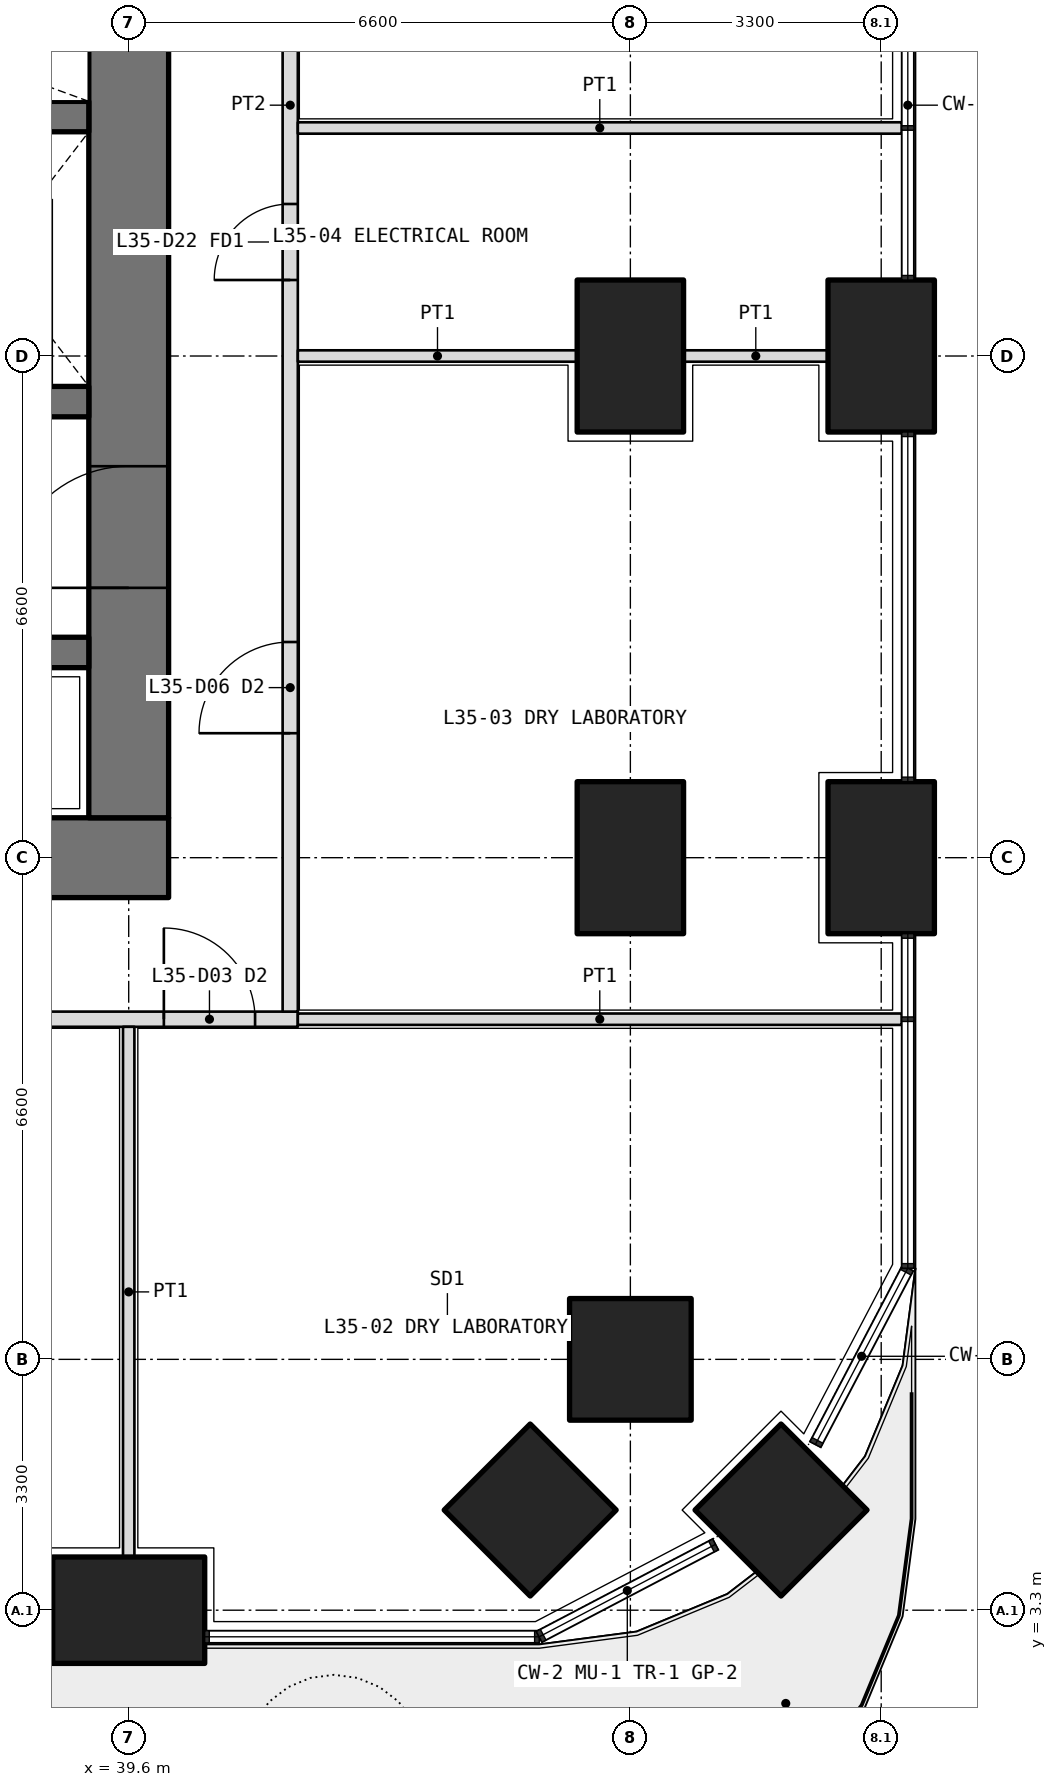
"""IFC4 building model, lengths in metres.
Left out: names, types, materials, properties, quantities, classifications, styles, units other than length and angle.
Written with IfcOpenShell. Run it as: python <this file> out.ifc"""

import sys

from ifc_helpers import new_model, si_unit, direction, frame, frame_2d, origin, origin_2d, place, context, subcontext, project, spatial, rectangle, extrude, element, fill, save


model = new_model("IFC4")
c1 = context("Model", 3, precision=1e-05, world=origin(), true_north=direction((0.0, 1.0)))
c2 = subcontext(c1, "Body", "Model", "MODEL_VIEW")
j1 = project(units=[si_unit("LENGTHUNIT", "METRE"), si_unit("PLANEANGLEUNIT", "RADIAN")], contexts=[c1])
p1 = place(None, origin())
s1 = spatial("IfcSite", under=j1, at=p1, CompositionType="ELEMENT")
p2 = place(p1, origin())
s2 = spatial("IfcBuilding", under=s1, at=p2, CompositionType="ELEMENT")
p3 = place(p2, frame((0.0, 0.0, 155.7)))
s3 = spatial("IfcBuildingStorey", under=s2, at=p3, CompositionType="ELEMENT", Elevation=155.7)
p4 = place(p3, frame((48.182, 4.618, 0.0), z_axis=(0.0, 0.0, 1.0), x_axis=(0.707106781187, 0.707106781187, 0.0)))
e1 = element("IfcColumn", 1, at=p4, inside=s3, PredefinedType="COLUMN", context=c2, shape_type="SweptSolid", body=[
    extrude(rectangle(XDim=1.6, YDim=1.6, at=origin_2d()), origin(), (0.0, 0.0, 1.0), 4.2),
])
for number, where, z_axis, x_axis in (
    (2, (39.6, 3.3, 0.0), (0.0, 0.0, 1.0), (1.0, 0.0, 0.0)),
    (3, (49.5, 13.2, 0.0), (0.0, 0.0, 1.0), (0.0, 1.0, 0.0)),
    (4, (49.5, 19.8, 0.0), (0.0, 0.0, 1.0), (0.0, 1.0, 0.0)),
):
    element("IfcColumn", number, at=place(p3, frame(where, z_axis=z_axis, x_axis=x_axis)), inside=s3, PredefinedType="COLUMN", context=c2, shape_type="SweptSolid", body=[
        extrude(rectangle(XDim=2.0, YDim=1.4, at=origin_2d()), origin(), (0.0, 0.0, 1.0), 4.2),
    ])
for number, where, z_axis, x_axis in (
    (5, (46.2, 6.6, 0.0), (0.0, 0.0, 1.0), (1.0, 0.0, 0.0)),
    (6, (44.882, 4.618, 0.0), (0.0, 0.0, 1.0), (0.707, 0.707, 0.0)),
):
    element("IfcColumn", number, at=place(p3, frame(where, z_axis=z_axis, x_axis=x_axis)), inside=s3, PredefinedType="COLUMN", context=c2, shape_type="SweptSolid", body=[
        extrude(rectangle(XDim=1.6, YDim=1.6, at=origin_2d()), origin(), (0.0, 0.0, 1.0), 4.2),
    ])
for number, where, z_axis, x_axis in (
    (7, (46.2, 13.2, 0.0), (0.0, 0.0, 1.0), (0.0, 1.0, 0.0)),
    (8, (46.2, 19.8, 0.0), (0.0, 0.0, 1.0), (0.0, 1.0, 0.0)),
):
    element("IfcColumn", number, at=place(p3, frame(where, z_axis=z_axis, x_axis=x_axis)), inside=s3, PredefinedType="COLUMN", context=c2, shape_type="SweptSolid", body=[
        extrude(rectangle(XDim=2.0, YDim=1.4, at=origin_2d()), origin(), (0.0, 0.0, 1.0), 4.2),
    ])
p5 = place(p3, frame((12.675, 13.2, 0.0), z_axis=(0.0, 0.0, 1.0), x_axis=(1.0, 0.0, 0.0)))
e9 = element("IfcWall", 9, at=p5, inside=s3, PredefinedType="SHEAR", context=c2, shape_type="SweptSolid", body=[
    extrude(rectangle(XDim=27.45, YDim=1.05, at=frame_2d((13.725, 0.0))), origin(), (0.0, 0.0, 1.0), 4.2),
])
p6 = place(p3, frame((39.6, 13.725, 0.0), z_axis=(0.0, 0.0, 1.0), x_axis=(0.0, 1.0, 0.0)))
e10 = element("IfcWall", 10, at=p6, inside=s3, PredefinedType="SHEAR", context=c2, shape_type="SweptSolid", body=[
    extrude(rectangle(XDim=18.75, YDim=1.05, at=frame_2d((9.375, 0.0))), origin(), (0.0, 0.0, 1.0), 4.2),
])
p7 = place(p6, frame((3.025, 0.0, 0.0)))
e11 = element("IfcOpeningElement", 11, at=p7, cuts=e10, PredefinedType="OPENING", context=c2, shape_type="SweptSolid", body=[
    extrude(rectangle(XDim=1.6, YDim=2.1, at=frame_2d((0.8, 1.05))), frame((0.0, 0.535, 0.0), z_axis=(0.0, -1.0, 0.0), x_axis=(1.0, 0.0, 0.0)), (0.0, 0.0, 1.0), 1.07),
])
p8 = place(p6, frame((13.825, 0.0, 0.0)))
e12 = element("IfcOpeningElement", 12, at=p8, cuts=e10, PredefinedType="OPENING", context=c2, shape_type="SweptSolid", body=[
    extrude(rectangle(XDim=1.6, YDim=2.1, at=frame_2d((0.8, 1.05))), frame((0.0, 0.535, 0.0), z_axis=(0.0, -1.0, 0.0), x_axis=(1.0, 0.0, 0.0)), (0.0, 0.0, 1.0), 1.07),
])
p9 = place(p3, frame((13.725, 15.9, 0.0), z_axis=(0.0, 0.0, 1.0), x_axis=(1.0, 0.0, 0.0)))
e13 = element("IfcWall", 13, at=p9, inside=s3, PredefinedType="SHEAR", context=c2, shape_type="SweptSolid", body=[
    extrude(rectangle(XDim=25.35, YDim=0.4, at=frame_2d((12.675, 0.0))), origin(), (0.0, 0.0, 1.0), 4.2),
])
p10 = place(p9, frame((0.837, 0.0, 0.0)))
e14 = element("IfcOpeningElement", 14, at=p10, cuts=e13, PredefinedType="OPENING", context=c2, shape_type="SweptSolid", body=[
    extrude(rectangle(XDim=1.0, YDim=2.1, at=frame_2d((0.5, 1.05))), frame((0.0, 0.21, 0.0), z_axis=(0.0, -1.0, 0.0), x_axis=(1.0, 0.0, 0.0)), (0.0, 0.0, 1.0), 0.42),
])
p11 = place(p9, frame((3.925, 0.0, 0.0)))
e15 = element("IfcOpeningElement", 15, at=p11, cuts=e13, PredefinedType="OPENING", context=c2, shape_type="SweptSolid", body=[
    extrude(rectangle(XDim=1.0, YDim=2.1, at=frame_2d((0.5, 1.05))), frame((0.0, 0.21, 0.0), z_axis=(0.0, -1.0, 0.0), x_axis=(1.0, 0.0, 0.0)), (0.0, 0.0, 1.0), 0.42),
])
p12 = place(p9, frame((7.225, 0.0, 0.0)))
e16 = element("IfcOpeningElement", 16, at=p12, cuts=e13, PredefinedType="OPENING", context=c2, shape_type="SweptSolid", body=[
    extrude(rectangle(XDim=1.0, YDim=2.1, at=frame_2d((0.5, 1.05))), frame((0.0, 0.21, 0.0), z_axis=(0.0, -1.0, 0.0), x_axis=(1.0, 0.0, 0.0)), (0.0, 0.0, 1.0), 0.42),
])
p13 = place(p9, frame((10.525, 0.0, 0.0)))
e17 = element("IfcOpeningElement", 17, at=p13, cuts=e13, PredefinedType="OPENING", context=c2, shape_type="SweptSolid", body=[
    extrude(rectangle(XDim=1.0, YDim=2.1, at=frame_2d((0.5, 1.05))), frame((0.0, 0.21, 0.0), z_axis=(0.0, -1.0, 0.0), x_axis=(1.0, 0.0, 0.0)), (0.0, 0.0, 1.0), 0.42),
])
p14 = place(p9, frame((13.825, 0.0, 0.0)))
e18 = element("IfcOpeningElement", 18, at=p14, cuts=e13, PredefinedType="OPENING", context=c2, shape_type="SweptSolid", body=[
    extrude(rectangle(XDim=1.0, YDim=2.1, at=frame_2d((0.5, 1.05))), frame((0.0, 0.21, 0.0), z_axis=(0.0, -1.0, 0.0), x_axis=(1.0, 0.0, 0.0)), (0.0, 0.0, 1.0), 0.42),
])
p15 = place(p9, frame((17.125, 0.0, 0.0)))
e19 = element("IfcOpeningElement", 19, at=p15, cuts=e13, PredefinedType="OPENING", context=c2, shape_type="SweptSolid", body=[
    extrude(rectangle(XDim=1.0, YDim=2.1, at=frame_2d((0.5, 1.05))), frame((0.0, 0.21, 0.0), z_axis=(0.0, -1.0, 0.0), x_axis=(1.0, 0.0, 0.0)), (0.0, 0.0, 1.0), 0.42),
])
p16 = place(p9, frame((20.425, 0.0, 0.0)))
e20 = element("IfcOpeningElement", 20, at=p16, cuts=e13, PredefinedType="OPENING", context=c2, shape_type="SweptSolid", body=[
    extrude(rectangle(XDim=1.0, YDim=2.1, at=frame_2d((0.5, 1.05))), frame((0.0, 0.21, 0.0), z_axis=(0.0, -1.0, 0.0), x_axis=(1.0, 0.0, 0.0)), (0.0, 0.0, 1.0), 0.42),
])
p17 = place(p9, frame((23.512, 0.0, 0.0)))
e21 = element("IfcOpeningElement", 21, at=p17, cuts=e13, PredefinedType="OPENING", context=c2, shape_type="SweptSolid", body=[
    extrude(rectangle(XDim=1.0, YDim=2.1, at=frame_2d((0.5, 1.05))), frame((0.0, 0.21, 0.0), z_axis=(0.0, -1.0, 0.0), x_axis=(1.0, 0.0, 0.0)), (0.0, 0.0, 1.0), 0.42),
])
p18 = place(p3, frame((13.725, 19.2, 0.0), z_axis=(0.0, 0.0, 1.0), x_axis=(1.0, 0.0, 0.0)))
e22 = element("IfcWall", 22, at=p18, inside=s3, PredefinedType="SHEAR", context=c2, shape_type="SweptSolid", body=[
    extrude(rectangle(XDim=25.35, YDim=0.4, at=frame_2d((12.675, 0.0))), origin(), (0.0, 0.0, 1.0), 4.2),
])
p19 = place(p18, frame((10.575, 0.0, 0.0)))
e23 = element("IfcOpeningElement", 23, at=p19, cuts=e22, PredefinedType="OPENING", context=c2, shape_type="SweptSolid", body=[
    extrude(rectangle(XDim=0.9, YDim=2.1, at=frame_2d((0.45, 1.05))), frame((0.0, 0.21, 0.0), z_axis=(0.0, -1.0, 0.0), x_axis=(1.0, 0.0, 0.0)), (0.0, 0.0, 1.0), 0.42),
])
p20 = place(p18, frame((13.875, 0.0, 0.0)))
e24 = element("IfcOpeningElement", 24, at=p20, cuts=e22, PredefinedType="OPENING", context=c2, shape_type="SweptSolid", body=[
    extrude(rectangle(XDim=0.9, YDim=2.1, at=frame_2d((0.45, 1.05))), frame((0.0, 0.21, 0.0), z_axis=(0.0, -1.0, 0.0), x_axis=(1.0, 0.0, 0.0)), (0.0, 0.0, 1.0), 0.42),
])
p21 = place(p18, frame((0.2, 0.0, 0.0)))
e25 = element("IfcOpeningElement", 25, at=p21, cuts=e22, PredefinedType="OPENING", context=c2, shape_type="SweptSolid", body=[
    extrude(rectangle(XDim=1.2, YDim=2.1, at=frame_2d((0.6, 1.05))), frame((0.0, 0.21, 0.0), z_axis=(0.0, -1.0, 0.0), x_axis=(1.0, 0.0, 0.0)), (0.0, 0.0, 1.0), 0.42),
])
p22 = place(p18, frame((23.512, 0.0, 0.0)))
e26 = element("IfcOpeningElement", 26, at=p22, cuts=e22, PredefinedType="OPENING", context=c2, shape_type="SweptSolid", body=[
    extrude(rectangle(XDim=1.1, YDim=2.1, at=frame_2d((0.55, 1.05))), frame((0.0, 0.21, 0.0), z_axis=(0.0, -1.0, 0.0), x_axis=(1.0, 0.0, 0.0)), (0.0, 0.0, 1.0), 0.42),
])
p23 = place(p18, frame((17.125, 0.0, 0.0)))
e27 = element("IfcOpeningElement", 27, at=p23, cuts=e22, PredefinedType="OPENING", context=c2, shape_type="SweptSolid", body=[
    extrude(rectangle(XDim=1.1, YDim=2.1, at=frame_2d((0.55, 1.05))), frame((0.0, 0.21, 0.0), z_axis=(0.0, -1.0, 0.0), x_axis=(1.0, 0.0, 0.0)), (0.0, 0.0, 1.0), 0.42),
])
p24 = place(p18, frame((20.325, 0.0, 0.0)))
e28 = element("IfcOpeningElement", 28, at=p24, cuts=e22, PredefinedType="OPENING", context=c2, shape_type="SweptSolid", body=[
    extrude(rectangle(XDim=1.1, YDim=2.1, at=frame_2d((0.55, 1.05))), frame((0.0, 0.21, 0.0), z_axis=(0.0, -1.0, 0.0), x_axis=(1.0, 0.0, 0.0)), (0.0, 0.0, 1.0), 0.42),
])
p25 = place(p3, frame((13.725, 22.95, 0.0), z_axis=(0.0, 0.0, 1.0), x_axis=(1.0, 0.0, 0.0)))
e29 = element("IfcWall", 29, at=p25, inside=s3, PredefinedType="SHEAR", context=c2, shape_type="SweptSolid", body=[
    extrude(rectangle(XDim=25.35, YDim=0.4, at=frame_2d((12.675, 0.0))), origin(), (0.0, 0.0, 1.0), 4.2),
])
p26 = place(p3, frame((10.975, 11.075, 0.0), z_axis=(0.0, 0.0, 1.0), x_axis=(1.0, 0.0, 0.0)))
e30 = element("IfcWall", 30, at=p26, inside=s3, PredefinedType="PARTITIONING", context=c2, shape_type="SweptSolid", body=[
    extrude(rectangle(XDim=30.85, YDim=0.2, at=frame_2d((15.425, 0.0))), origin(), (0.0, 0.0, 1.0), 2.85),
])
p27 = place(p26, frame((13.863, 0.0, 0.0)))
e31 = element("IfcOpeningElement", 31, at=p27, cuts=e30, PredefinedType="OPENING", context=c2, shape_type="SweptSolid", body=[
    extrude(rectangle(XDim=1.0, YDim=2.1, at=frame_2d((0.5, 1.05))), frame((0.0, 0.11, 0.0), z_axis=(0.0, -1.0, 0.0), x_axis=(1.0, 0.0, 0.0)), (0.0, 0.0, 1.0), 0.22),
])
p28 = place(p26, frame((29.087, 0.0, 0.0)))
e32 = element("IfcOpeningElement", 32, at=p28, cuts=e30, PredefinedType="OPENING", context=c2, shape_type="SweptSolid", body=[
    extrude(rectangle(XDim=1.2, YDim=2.1, at=frame_2d((0.6, 1.05))), frame((0.0, 0.11, 0.0), z_axis=(0.0, -1.0, 0.0), x_axis=(1.0, 0.0, 0.0)), (0.0, 0.0, 1.0), 0.22),
])
p29 = place(p3, frame((41.725, 11.175, 0.0), z_axis=(0.0, 0.0, 1.0), x_axis=(0.0, 1.0, 0.0)))
e33 = element("IfcWall", 33, at=p29, inside=s3, PredefinedType="PARTITIONING", context=c2, shape_type="SweptSolid", body=[
    extrude(rectangle(XDim=23.85, YDim=0.2, at=frame_2d((11.925, 0.0))), origin(), (0.0, 0.0, 1.0), 2.85),
])
p30 = place(p29, frame((3.663, 0.0, 0.0)))
e34 = element("IfcOpeningElement", 34, at=p30, cuts=e33, PredefinedType="OPENING", context=c2, shape_type="SweptSolid", body=[
    extrude(rectangle(XDim=1.2, YDim=2.1, at=frame_2d((0.6, 1.05))), frame((0.0, 0.11, 0.0), z_axis=(0.0, -1.0, 0.0), x_axis=(1.0, 0.0, 0.0)), (0.0, 0.0, 1.0), 0.22),
])
p31 = place(p29, frame((9.625, 0.0, 0.0)))
e35 = element("IfcOpeningElement", 35, at=p31, cuts=e33, PredefinedType="OPENING", context=c2, shape_type="SweptSolid", body=[
    extrude(rectangle(XDim=1.0, YDim=2.1, at=frame_2d((0.5, 1.05))), frame((0.0, 0.11, 0.0), z_axis=(0.0, -1.0, 0.0), x_axis=(1.0, 0.0, 0.0)), (0.0, 0.0, 1.0), 0.22),
])
p32 = place(p29, frame((12.975, 0.0, 0.0)))
e36 = element("IfcOpeningElement", 36, at=p32, cuts=e33, PredefinedType="OPENING", context=c2, shape_type="SweptSolid", body=[
    extrude(rectangle(XDim=0.9, YDim=2.1, at=frame_2d((0.45, 1.05))), frame((0.0, 0.11, 0.0), z_axis=(0.0, -1.0, 0.0), x_axis=(1.0, 0.0, 0.0)), (0.0, 0.0, 1.0), 0.22),
])
p33 = place(p29, frame((16.375, 0.0, 0.0)))
e37 = element("IfcOpeningElement", 37, at=p33, cuts=e33, PredefinedType="OPENING", context=c2, shape_type="SweptSolid", body=[
    extrude(rectangle(XDim=1.0, YDim=2.1, at=frame_2d((0.5, 1.05))), frame((0.0, 0.11, 0.0), z_axis=(0.0, -1.0, 0.0), x_axis=(1.0, 0.0, 0.0)), (0.0, 0.0, 1.0), 0.22),
])
p34 = place(p29, frame((19.675, 0.0, 0.0)))
e38 = element("IfcOpeningElement", 38, at=p34, cuts=e33, PredefinedType="OPENING", context=c2, shape_type="SweptSolid", body=[
    extrude(rectangle(XDim=1.0, YDim=2.1, at=frame_2d((0.5, 1.05))), frame((0.0, 0.11, 0.0), z_axis=(0.0, -1.0, 0.0), x_axis=(1.0, 0.0, 0.0)), (0.0, 0.0, 1.0), 0.22),
])
p35 = place(p29, frame((22.288, 0.0, 0.0)))
e39 = element("IfcOpeningElement", 39, at=p35, cuts=e33, PredefinedType="OPENING", context=c2, shape_type="SweptSolid", body=[
    extrude(rectangle(XDim=1.2, YDim=2.1, at=frame_2d((0.6, 1.05))), frame((0.0, 0.11, 0.0), z_axis=(0.0, -1.0, 0.0), x_axis=(1.0, 0.0, 0.0)), (0.0, 0.0, 1.0), 0.22),
])
p36 = place(p3, frame((49.77, 11.075, 0.0), z_axis=(0.0, 0.0, 1.0), x_axis=(-1.0, 0.0, 0.0)))
e40 = element("IfcWall", 40, at=p36, inside=s3, PredefinedType="PARTITIONING", context=c2, shape_type="SweptSolid", body=[
    extrude(rectangle(XDim=7.945, YDim=0.15, at=frame_2d((3.973, 0.0))), origin(), (0.0, 0.0, 1.0), 2.7),
])
p37 = place(p3, frame((39.6, 4.0, 0.0), z_axis=(0.0, 0.0, 1.0), x_axis=(0.0, 1.0, 0.0)))
e41 = element("IfcWall", 41, at=p37, inside=s3, PredefinedType="PARTITIONING", context=c2, shape_type="SweptSolid", body=[
    extrude(rectangle(XDim=6.975, YDim=0.15, at=frame_2d((3.488, 0.0))), origin(), (0.0, 0.0, 1.0), 2.85),
])
p38 = place(p3, frame((49.77, 22.8, 0.0), z_axis=(0.0, 0.0, 1.0), x_axis=(-1.0, 0.0, 0.0)))
e42 = element("IfcWall", 42, at=p38, inside=s3, PredefinedType="PARTITIONING", context=c2, shape_type="SweptSolid", body=[
    extrude(rectangle(XDim=7.945, YDim=0.15, at=frame_2d((3.973, 0.0))), origin(), (0.0, 0.0, 1.0), 2.7),
])
p39 = place(p3, frame((48.8, 19.8, 0.0), z_axis=(0.0, 0.0, 1.0), x_axis=(-1.0, 0.0, 0.0)))
e43 = element("IfcWall", 43, at=p39, inside=s3, PredefinedType="PARTITIONING", context=c2, shape_type="SweptSolid", body=[
    extrude(rectangle(XDim=1.9, YDim=0.15, at=frame_2d((0.95, 0.0))), origin(), (0.0, 0.0, 1.0), 2.85),
])
p40 = place(p3, frame((45.5, 19.8, 0.0), z_axis=(0.0, 0.0, 1.0), x_axis=(-1.0, 0.0, 0.0)))
e44 = element("IfcWall", 44, at=p40, inside=s3, PredefinedType="PARTITIONING", context=c2, shape_type="SweptSolid", body=[
    extrude(rectangle(XDim=3.675, YDim=0.15, at=frame_2d((1.837, 0.0))), origin(), (0.0, 0.0, 1.0), 2.85),
])
p41 = place(p28, origin())
e45 = element("IfcDoor", 45, at=p41, inside=s3, OperationType="DOUBLE_DOOR_SINGLE_SWING", PredefinedType="DOOR", context=c2, shape_type="SweptSolid", body=[
    extrude(rectangle(XDim=1.2, YDim=2.1, at=frame_2d((0.6, 1.05))), frame((0.0, 0.025, 0.0), z_axis=(0.0, -1.0, 0.0), x_axis=(1.0, 0.0, 0.0)), (0.0, 0.0, 1.0), 0.05),
])
fill(e32, e45)
p42 = place(p30, origin())
e46 = element("IfcDoor", 46, at=p42, inside=s3, OperationType="DOUBLE_DOOR_SINGLE_SWING", PredefinedType="DOOR", context=c2, shape_type="SweptSolid", body=[
    extrude(rectangle(XDim=1.2, YDim=2.1, at=frame_2d((0.6, 1.05))), frame((0.0, 0.025, 0.0), z_axis=(0.0, -1.0, 0.0), x_axis=(1.0, 0.0, 0.0)), (0.0, 0.0, 1.0), 0.05),
])
fill(e34, e46)
p43 = place(p31, origin())
e47 = element("IfcDoor", 47, at=p43, inside=s3, OperationType="SINGLE_SWING_LEFT", PredefinedType="DOOR", context=c2, shape_type="SweptSolid", body=[
    extrude(rectangle(XDim=1.0, YDim=2.1, at=frame_2d((0.5, 1.05))), frame((0.0, 0.025, 0.0), z_axis=(0.0, -1.0, 0.0), x_axis=(1.0, 0.0, 0.0)), (0.0, 0.0, 1.0), 0.05),
])
fill(e35, e47)
p44 = place(p7, origin())
e48 = element("IfcDoor", 48, at=p44, inside=s3, OperationType="DOUBLE_DOOR_DOUBLE_SWING", PredefinedType="DOOR", context=c2, shape_type="SweptSolid", body=[
    extrude(rectangle(XDim=1.6, YDim=2.1, at=frame_2d((0.8, 1.05))), frame((0.0, 0.025, 0.0), z_axis=(0.0, -1.0, 0.0), x_axis=(1.0, 0.0, 0.0)), (0.0, 0.0, 1.0), 0.05),
])
fill(e11, e48)
save(model, sys.argv[1])
